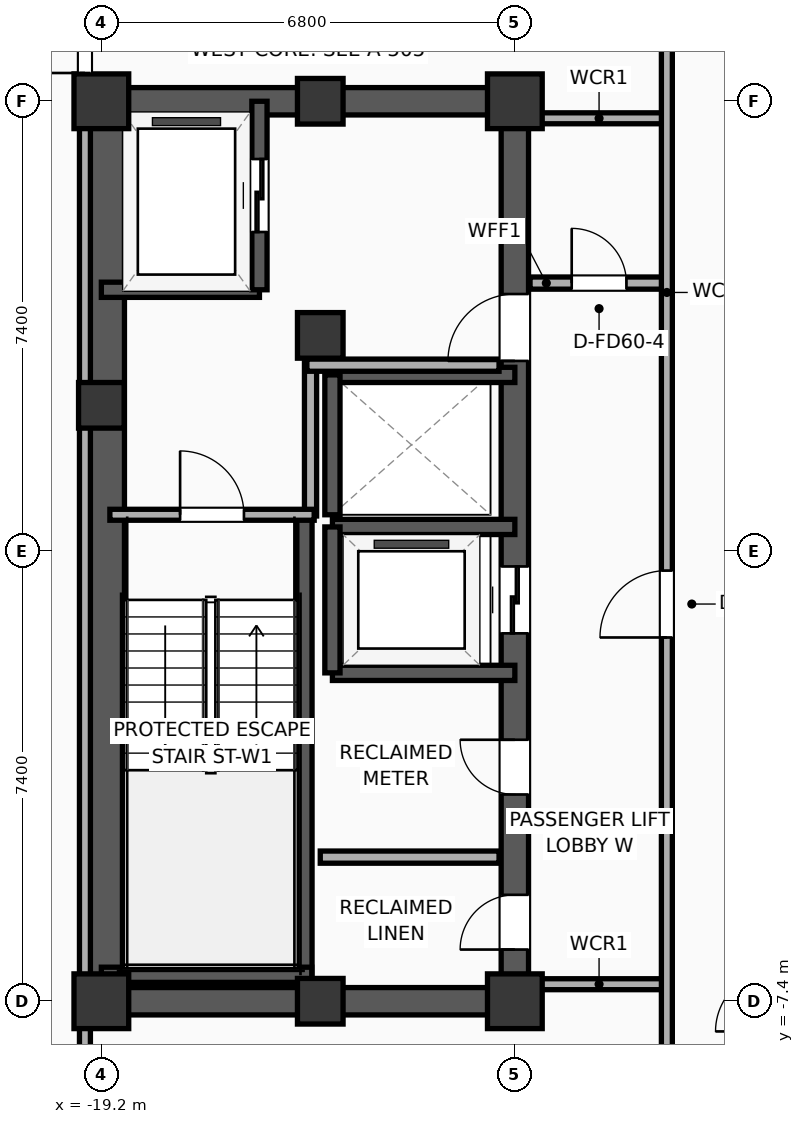
"""IFC4 building model, lengths in metres.
Left out: names, types, materials, properties, quantities, classifications, styles, units other than length and angle.
Written with IfcOpenShell. Run it as: python <this file> out.ifc"""

import sys

from ifc_helpers import new_model, si_unit, direction, frame, frame_2d, origin, origin_2d, place, context, subcontext, project, spatial, rectangle, extrude, element, fill, save


model = new_model("IFC4")
c1 = context("Model", 3, precision=1e-05, world=origin(), true_north=direction((0.0, 1.0)))
c2 = subcontext(c1, "Body", "Model", "MODEL_VIEW")
j1 = project(units=[si_unit("LENGTHUNIT", "METRE"), si_unit("PLANEANGLEUNIT", "RADIAN")], contexts=[c1])
p1 = place(None, origin())
s1 = spatial("IfcSite", under=j1, at=p1, CompositionType="ELEMENT")
p2 = place(p1, origin())
s2 = spatial("IfcBuilding", under=s1, at=p2, CompositionType="ELEMENT")
p3 = place(p2, frame((0.0, 0.0, 144.3)))
s3 = spatial("IfcBuildingStorey", under=s2, at=p3, CompositionType="ELEMENT", Elevation=144.3)
p4 = place(p3, frame((-19.2, -7.4, 0.0), z_axis=(0.0, 0.0, 1.0), x_axis=(1.0, 0.0, 0.0)))
e1 = element("IfcColumn", 1, at=p4, inside=s3, PredefinedType="COLUMN", context=c2, shape_type="SweptSolid", body=[
    extrude(rectangle(XDim=0.9, YDim=0.9, at=origin_2d()), origin(), (0.0, 0.0, 1.0), 3.9),
])
p5 = place(p3, frame((-19.2, 2.4, 0.0), z_axis=(0.0, 0.0, 1.0), x_axis=(1.0, 0.0, 0.0)))
e2 = element("IfcColumn", 2, at=p5, inside=s3, PredefinedType="COLUMN", context=c2, shape_type="SweptSolid", body=[
    extrude(rectangle(XDim=0.75, YDim=0.75, at=origin_2d()), origin(), (0.0, 0.0, 1.0), 3.9),
])
p6 = place(p3, frame((-19.2, 7.4, 0.0), z_axis=(0.0, 0.0, 1.0), x_axis=(1.0, 0.0, 0.0)))
e3 = element("IfcColumn", 3, at=p6, inside=s3, PredefinedType="COLUMN", context=c2, shape_type="SweptSolid", body=[
    extrude(rectangle(XDim=0.9, YDim=0.9, at=origin_2d()), origin(), (0.0, 0.0, 1.0), 3.9),
])
for number, where, z_axis, x_axis in (
    (4, (-15.6, -7.4, 0.0), (0.0, 0.0, 1.0), (1.0, 0.0, 0.0)),
    (5, (-15.6, 7.4, 0.0), (0.0, 0.0, 1.0), (1.0, 0.0, 0.0)),
):
    element("IfcColumn", number, at=place(p3, frame(where, z_axis=z_axis, x_axis=x_axis)), inside=s3, PredefinedType="COLUMN", context=c2, shape_type="SweptSolid", body=[
        extrude(rectangle(XDim=0.75, YDim=0.75, at=origin_2d()), origin(), (0.0, 0.0, 1.0), 3.9),
    ])
p7 = place(p3, frame((-12.4, -7.4, 0.0), z_axis=(0.0, 0.0, 1.0), x_axis=(1.0, 0.0, 0.0)))
e6 = element("IfcColumn", 6, at=p7, inside=s3, PredefinedType="COLUMN", context=c2, shape_type="SweptSolid", body=[
    extrude(rectangle(XDim=0.9, YDim=0.9, at=origin_2d()), origin(), (0.0, 0.0, 1.0), 3.9),
])
p8 = place(p3, frame((-15.6, 3.55, 0.0), z_axis=(0.0, 0.0, 1.0), x_axis=(1.0, 0.0, 0.0)))
e7 = element("IfcColumn", 7, at=p8, inside=s3, PredefinedType="COLUMN", context=c2, shape_type="SweptSolid", body=[
    extrude(rectangle(XDim=0.75, YDim=0.75, at=origin_2d()), origin(), (0.0, 0.0, 1.0), 3.9),
])
p9 = place(p3, frame((-12.4, 7.4, 0.0), z_axis=(0.0, 0.0, 1.0), x_axis=(1.0, 0.0, 0.0)))
e8 = element("IfcColumn", 8, at=p9, inside=s3, PredefinedType="COLUMN", context=c2, shape_type="SweptSolid", body=[
    extrude(rectangle(XDim=0.9, YDim=0.9, at=origin_2d()), origin(), (0.0, 0.0, 1.0), 3.9),
])
for number, where, z_axis, x_axis in (
    (9, (-19.425, -7.4, 0.0), (0.0, 0.0, 1.0), (1.0, 0.0, 0.0)),
    (10, (-19.425, 7.4, 0.0), (0.0, 0.0, 1.0), (1.0, 0.0, 0.0)),
):
    element("IfcWall", number, at=place(p3, frame(where, z_axis=z_axis, x_axis=x_axis)), inside=s3, PredefinedType="SHEAR", context=c2, shape_type="SweptSolid", body=[
        extrude(rectangle(XDim=7.25, YDim=0.45, at=frame_2d((3.625, 0.0))), origin(), (0.0, 0.0, 1.0), 3.65),
    ])
p10 = place(p3, frame((-19.145, -7.4, 0.0), z_axis=(0.0, 0.0, 1.0), x_axis=(0.0, 1.0, 0.0)))
e11 = element("IfcWall", 11, at=p10, inside=s3, PredefinedType="SHEAR", context=c2, shape_type="SweptSolid", body=[
    extrude(rectangle(XDim=14.8, YDim=0.65, at=frame_2d((7.4, 0.0))), origin(), (0.0, 0.0, 1.0), 3.65),
])
p11 = place(p3, frame((-12.4, -7.4, 0.0), z_axis=(0.0, 0.0, 1.0), x_axis=(0.0, 1.0, 0.0)))
e12 = element("IfcWall", 12, at=p11, inside=s3, PredefinedType="SHEAR", context=c2, shape_type="SweptSolid", body=[
    extrude(rectangle(XDim=14.8, YDim=0.45, at=frame_2d((7.4, 0.0))), origin(), (0.0, 0.0, 1.0), 3.65),
])
p12 = place(p11, frame((6.05, 0.0, 0.0)))
e13 = element("IfcOpeningElement", 13, at=p12, cuts=e12, PredefinedType="OPENING", context=c2, shape_type="SweptSolid", body=[
    extrude(rectangle(XDim=1.1, YDim=2.05, at=frame_2d((0.55, 1.025))), frame((0.0, 0.235, 0.0), z_axis=(0.0, -1.0, 0.0), x_axis=(1.0, 0.0, 0.0)), (0.0, 0.0, 1.0), 0.47),
])
p13 = place(p11, frame((10.53, 0.0, 0.0)))
e14 = element("IfcOpeningElement", 14, at=p13, cuts=e12, PredefinedType="OPENING", context=c2, shape_type="SweptSolid", body=[
    extrude(rectangle(XDim=1.1, YDim=2.05, at=frame_2d((0.55, 1.025))), frame((0.0, 0.235, 0.0), z_axis=(0.0, -1.0, 0.0), x_axis=(1.0, 0.0, 0.0)), (0.0, 0.0, 1.0), 0.47),
])
p14 = place(p11, frame((0.85, 0.0, 0.0)))
e15 = element("IfcOpeningElement", 15, at=p14, cuts=e12, PredefinedType="OPENING", context=c2, shape_type="SweptSolid", body=[
    extrude(rectangle(XDim=0.9, YDim=2.05, at=frame_2d((0.45, 1.025))), frame((0.0, 0.235, 0.0), z_axis=(0.0, -1.0, 0.0), x_axis=(1.0, 0.0, 0.0)), (0.0, 0.0, 1.0), 0.47),
])
p15 = place(p11, frame((3.4, 0.0, 0.0)))
e16 = element("IfcOpeningElement", 16, at=p15, cuts=e12, PredefinedType="OPENING", context=c2, shape_type="SweptSolid", body=[
    extrude(rectangle(XDim=0.9, YDim=2.05, at=frame_2d((0.45, 1.025))), frame((0.0, 0.235, 0.0), z_axis=(0.0, -1.0, 0.0), x_axis=(1.0, 0.0, 0.0)), (0.0, 0.0, 1.0), 0.47),
])
p16 = place(p3, frame((-15.86, -7.085, 0.0), z_axis=(0.0, 0.0, 1.0), x_axis=(0.0, 1.0, 0.0)))
e17 = element("IfcWall", 17, at=p16, inside=s3, PredefinedType="SOLIDWALL", context=c2, shape_type="SweptSolid", body=[
    extrude(rectangle(XDim=7.685, YDim=0.25, at=frame_2d((3.843, 0.0))), origin(), (0.0, 0.0, 1.0), 3.65),
])
p17 = place(p3, frame((-19.2, -6.965, 0.0), z_axis=(0.0, 0.0, 1.0), x_axis=(1.0, 0.0, 0.0)))
e18 = element("IfcWall", 18, at=p17, inside=s3, PredefinedType="SOLIDWALL", context=c2, shape_type="SweptSolid", body=[
    extrude(rectangle(XDim=3.46, YDim=0.25, at=frame_2d((1.73, 0.0))), origin(), (0.0, 0.0, 1.0), 3.65),
])
p18 = place(p3, frame((-19.2, 4.3, 0.0), z_axis=(0.0, 0.0, 1.0), x_axis=(1.0, 0.0, 0.0)))
e19 = element("IfcWall", 19, at=p18, inside=s3, PredefinedType="SOLIDWALL", context=c2, shape_type="SweptSolid", body=[
    extrude(rectangle(XDim=2.6, YDim=0.25, at=frame_2d((1.3, 0.0))), origin(), (0.0, 0.0, 1.0), 3.65),
])
p19 = place(p3, frame((-16.6, 4.3, 0.0), z_axis=(0.0, 0.0, 1.0), x_axis=(0.0, 1.0, 0.0)))
e20 = element("IfcWall", 20, at=p19, inside=s3, PredefinedType="SOLIDWALL", context=c2, shape_type="SweptSolid", body=[
    extrude(rectangle(XDim=3.1, YDim=0.25, at=frame_2d((1.55, 0.0))), origin(), (0.0, 0.0, 1.0), 3.65),
])
p20 = place(p19, frame((0.95, 0.0, 0.0)))
e21 = element("IfcOpeningElement", 21, at=p20, cuts=e20, PredefinedType="OPENING", context=c2, shape_type="SweptSolid", body=[
    extrude(rectangle(XDim=1.2, YDim=2.05, at=frame_2d((0.6, 1.025))), frame((0.0, 0.135, 0.0), z_axis=(0.0, -1.0, 0.0), x_axis=(1.0, 0.0, 0.0)), (0.0, 0.0, 1.0), 0.27),
])
for number, where, z_axis, x_axis in (
    (22, (-15.4, -2.0, 0.0), (0.0, 0.0, 1.0), (1.0, 0.0, 0.0)),
    (23, (-12.4, 0.4, 0.0), (0.0, 0.0, 1.0), (-1.0, 0.0, 0.0)),
):
    element("IfcWall", number, at=place(p3, frame(where, z_axis=z_axis, x_axis=x_axis)), inside=s3, PredefinedType="SOLIDWALL", context=c2, shape_type="SweptSolid", body=[
        extrude(rectangle(XDim=3.0, YDim=0.25, at=frame_2d((1.5, 0.0))), origin(), (0.0, 0.0, 1.0), 3.65),
    ])
p21 = place(p3, frame((-15.4, 0.4, 0.0), z_axis=(0.0, 0.0, 1.0), x_axis=(0.0, -1.0, 0.0)))
e24 = element("IfcWall", 24, at=p21, inside=s3, PredefinedType="SOLIDWALL", context=c2, shape_type="SweptSolid", body=[
    extrude(rectangle(XDim=2.4, YDim=0.25, at=frame_2d((1.2, 0.0))), origin(), (0.0, 0.0, 1.0), 3.65),
])
p22 = place(p3, frame((-12.4, 2.9, 0.0), z_axis=(0.0, 0.0, 1.0), x_axis=(-1.0, 0.0, 0.0)))
e25 = element("IfcWall", 25, at=p22, inside=s3, PredefinedType="SOLIDWALL", context=c2, shape_type="SweptSolid", body=[
    extrude(rectangle(XDim=3.0, YDim=0.25, at=frame_2d((1.5, 0.0))), origin(), (0.0, 0.0, 1.0), 3.65),
])
p23 = place(p3, frame((-15.4, 2.9, 0.0), z_axis=(0.0, 0.0, 1.0), x_axis=(0.0, -1.0, 0.0)))
e26 = element("IfcWall", 26, at=p23, inside=s3, PredefinedType="SOLIDWALL", context=c2, shape_type="SweptSolid", body=[
    extrude(rectangle(XDim=2.3, YDim=0.25, at=frame_2d((1.15, 0.0))), origin(), (0.0, 0.0, 1.0), 3.65),
])
p24 = place(p3, frame((-15.76, 0.58, 0.0), z_axis=(0.0, 0.0, 1.0), x_axis=(0.0, 1.0, 0.0)))
e27 = element("IfcWall", 27, at=p24, inside=s3, PredefinedType="PARTITIONING", context=c2, shape_type="SweptSolid", body=[
    extrude(rectangle(XDim=2.52, YDim=0.2, at=frame_2d((1.26, 0.0))), origin(), (0.0, 0.0, 1.0), 3.65),
])
p25 = place(p3, frame((-15.82, 3.06, 0.0), z_axis=(0.0, 0.0, 1.0), x_axis=(1.0, 0.0, 0.0)))
e28 = element("IfcWall", 28, at=p25, inside=s3, PredefinedType="PARTITIONING", context=c2, shape_type="SweptSolid", body=[
    extrude(rectangle(XDim=3.16, YDim=0.2, at=frame_2d((1.58, 0.0))), origin(), (0.0, 0.0, 1.0), 3.65),
])
p26 = place(p3, frame((-19.06, 0.6, 0.0), z_axis=(0.0, 0.0, 1.0), x_axis=(1.0, 0.0, 0.0)))
e29 = element("IfcWall", 29, at=p26, inside=s3, PredefinedType="PARTITIONING", context=c2, shape_type="SweptSolid", body=[
    extrude(rectangle(XDim=3.36, YDim=0.18, at=frame_2d((1.68, 0.0))), origin(), (0.0, 0.0, 1.0), 3.65),
])
p27 = place(p26, frame((1.155, 0.0, 0.0)))
e30 = element("IfcOpeningElement", 30, at=p27, cuts=e29, PredefinedType="OPENING", context=c2, shape_type="SweptSolid", body=[
    extrude(rectangle(XDim=1.05, YDim=2.05, at=frame_2d((0.525, 1.025))), frame((0.0, 0.1, 0.0), z_axis=(0.0, -1.0, 0.0), x_axis=(1.0, 0.0, 0.0)), (0.0, 0.0, 1.0), 0.2),
])
p28 = place(p3, frame((-15.6, -5.03, 0.0), z_axis=(0.0, 0.0, 1.0), x_axis=(1.0, 0.0, 0.0)))
e31 = element("IfcWall", 31, at=p28, inside=s3, PredefinedType="PARTITIONING", context=c2, shape_type="SweptSolid", body=[
    extrude(rectangle(XDim=2.94, YDim=0.2, at=frame_2d((1.47, 0.0))), origin(), (0.0, 0.0, 1.0), 3.65),
])
p29 = place(p3, frame((-12.15, 4.41, 0.0), z_axis=(0.0, 0.0, 1.0), x_axis=(1.0, 0.0, 0.0)))
e32 = element("IfcWall", 32, at=p29, inside=s3, PredefinedType="PARTITIONING", context=c2, shape_type="SweptSolid", body=[
    extrude(rectangle(XDim=2.27, YDim=0.2, at=frame_2d((1.135, 0.0))), origin(), (0.0, 0.0, 1.0), 3.65),
])
p30 = place(p29, frame((0.685, 0.0, 0.0)))
e33 = element("IfcOpeningElement", 33, at=p30, cuts=e32, PredefinedType="OPENING", context=c2, shape_type="SweptSolid", body=[
    extrude(rectangle(XDim=0.9, YDim=2.05, at=frame_2d((0.45, 1.025))), frame((0.0, 0.11, 0.0), z_axis=(0.0, -1.0, 0.0), x_axis=(1.0, 0.0, 0.0)), (0.0, 0.0, 1.0), 0.22),
])
for number, where, z_axis, x_axis in (
    (34, (-12.15, 7.12, 0.0), (0.0, 0.0, 1.0), (1.0, 0.0, 0.0)),
    (35, (-12.15, -7.12, 0.0), (0.0, 0.0, 1.0), (1.0, 0.0, 0.0)),
):
    element("IfcWall", number, at=place(p3, frame(where, z_axis=z_axis, x_axis=x_axis)), inside=s3, PredefinedType="PARTITIONING", context=c2, shape_type="SweptSolid", body=[
        extrude(rectangle(XDim=2.27, YDim=0.18, at=frame_2d((1.135, 0.0))), origin(), (0.0, 0.0, 1.0), 3.65),
    ])
p31 = place(p3, frame((-9.9, -8.68, 0.0), z_axis=(0.0, 0.0, 1.0), x_axis=(0.0, 1.0, 0.0)))
e36 = element("IfcWall", 36, at=p31, inside=s3, PredefinedType="PARTITIONING", context=c2, shape_type="SweptSolid", body=[
    extrude(rectangle(XDim=17.36, YDim=0.18, at=frame_2d((8.68, 0.0))), origin(), (0.0, 0.0, 1.0), 3.65),
])
p32 = place(p31, frame((7.262, 0.0, 0.0)))
e37 = element("IfcOpeningElement", 37, at=p32, cuts=e36, PredefinedType="OPENING", context=c2, shape_type="SweptSolid", body=[
    extrude(rectangle(XDim=1.1, YDim=2.05, at=frame_2d((0.55, 1.025))), frame((0.0, 0.1, 0.0), z_axis=(0.0, -1.0, 0.0), x_axis=(1.0, 0.0, 0.0)), (0.0, 0.0, 1.0), 0.2),
])
p33 = place(p3, frame((-19.47, -10.15, 0.0), z_axis=(0.0, 0.0, 1.0), x_axis=(0.0, 1.0, 0.0)))
e38 = element("IfcWall", 38, at=p33, inside=s3, PredefinedType="PARTITIONING", context=c2, shape_type="SweptSolid", body=[
    extrude(rectangle(XDim=20.3, YDim=0.18, at=frame_2d((10.15, 0.0))), origin(), (0.0, 0.0, 1.0), 2.54),
])
p34 = place(p33, frame((18.015, 0.0, 0.0)))
e39 = element("IfcOpeningElement", 39, at=p34, cuts=e38, PredefinedType="OPENING", context=c2, shape_type="SweptSolid", body=[
    extrude(rectangle(XDim=0.95, YDim=2.05, at=frame_2d((0.475, 1.025))), frame((0.0, 0.1, 0.0), z_axis=(0.0, -1.0, 0.0), x_axis=(1.0, 0.0, 0.0)), (0.0, 0.0, 1.0), 0.2),
])
p35 = place(p20, origin())
e40 = element("IfcDoor", 40, at=p35, inside=s3, OperationType="SLIDING_TO_LEFT", PredefinedType="DOOR", context=c2, shape_type="SweptSolid", body=[
    extrude(rectangle(XDim=1.2, YDim=2.05, at=frame_2d((0.6, 1.025))), frame((0.0, 0.025, 0.0), z_axis=(0.0, -1.0, 0.0), x_axis=(1.0, 0.0, 0.0)), (0.0, 0.0, 1.0), 0.05),
])
fill(e21, e40)
p36 = place(p12, origin())
e41 = element("IfcDoor", 41, at=p36, inside=s3, OperationType="SLIDING_TO_LEFT", PredefinedType="DOOR", context=c2, shape_type="SweptSolid", body=[
    extrude(rectangle(XDim=1.1, YDim=2.05, at=frame_2d((0.55, 1.025))), frame((0.0, 0.025, 0.0), z_axis=(0.0, -1.0, 0.0), x_axis=(1.0, 0.0, 0.0)), (0.0, 0.0, 1.0), 0.05),
])
fill(e13, e41)
p37 = place(p27, origin())
e42 = element("IfcDoor", 42, at=p37, inside=s3, OperationType="SINGLE_SWING_LEFT", PredefinedType="DOOR", context=c2, shape_type="SweptSolid", body=[
    extrude(rectangle(XDim=1.05, YDim=2.05, at=frame_2d((0.525, 1.025))), frame((0.0, 0.025, 0.0), z_axis=(0.0, -1.0, 0.0), x_axis=(1.0, 0.0, 0.0)), (0.0, 0.0, 1.0), 0.05),
])
fill(e30, e42)
p38 = place(p30, origin())
e43 = element("IfcDoor", 43, at=p38, inside=s3, OperationType="SINGLE_SWING_LEFT", PredefinedType="DOOR", context=c2, shape_type="SweptSolid", body=[
    extrude(rectangle(XDim=0.9, YDim=2.05, at=frame_2d((0.45, 1.025))), frame((0.0, 0.025, 0.0), z_axis=(0.0, -1.0, 0.0), x_axis=(1.0, 0.0, 0.0)), (0.0, 0.0, 1.0), 0.05),
])
fill(e33, e43)
p39 = place(p32, origin())
e44 = element("IfcDoor", 44, at=p39, inside=s3, OperationType="SINGLE_SWING_LEFT", PredefinedType="DOOR", context=c2, shape_type="SweptSolid", body=[
    extrude(rectangle(XDim=1.1, YDim=2.05, at=frame_2d((0.55, 1.025))), frame((0.0, 0.025, 0.0), z_axis=(0.0, -1.0, 0.0), x_axis=(1.0, 0.0, 0.0)), (0.0, 0.0, 1.0), 0.05),
])
fill(e37, e44)
p40 = place(p34, origin())
e45 = element("IfcDoor", 45, at=p40, inside=s3, OperationType="SINGLE_SWING_LEFT", PredefinedType="DOOR", context=c2, shape_type="SweptSolid", body=[
    extrude(rectangle(XDim=0.95, YDim=2.05, at=frame_2d((0.475, 1.025))), frame((0.0, 0.025, 0.0), z_axis=(0.0, -1.0, 0.0), x_axis=(1.0, 0.0, 0.0)), (0.0, 0.0, 1.0), 0.05),
])
fill(e39, e45)
p41 = place(p13, origin())
e46 = element("IfcDoor", 46, at=p41, inside=s3, OperationType="SINGLE_SWING_LEFT", PredefinedType="DOOR", context=c2, shape_type="SweptSolid", body=[
    extrude(rectangle(XDim=1.1, YDim=2.05, at=frame_2d((0.55, 1.025))), frame((0.0, 0.025, 0.0), z_axis=(0.0, -1.0, 0.0), x_axis=(1.0, 0.0, 0.0)), (0.0, 0.0, 1.0), 0.05),
])
fill(e14, e46)
p42 = place(p14, origin())
e47 = element("IfcDoor", 47, at=p42, inside=s3, OperationType="SINGLE_SWING_LEFT", PredefinedType="DOOR", context=c2, shape_type="SweptSolid", body=[
    extrude(rectangle(XDim=0.9, YDim=2.05, at=frame_2d((0.45, 1.025))), frame((0.0, 0.025, 0.0), z_axis=(0.0, -1.0, 0.0), x_axis=(1.0, 0.0, 0.0)), (0.0, 0.0, 1.0), 0.05),
])
fill(e15, e47)
p43 = place(p15, origin())
e48 = element("IfcDoor", 48, at=p43, inside=s3, OperationType="SINGLE_SWING_RIGHT", PredefinedType="DOOR", context=c2, shape_type="SweptSolid", body=[
    extrude(rectangle(XDim=0.9, YDim=2.05, at=frame_2d((0.45, 1.025))), frame((0.0, 0.025, 0.0), z_axis=(0.0, -1.0, 0.0), x_axis=(1.0, 0.0, 0.0)), (0.0, 0.0, 1.0), 0.05),
])
fill(e16, e48)
save(model, sys.argv[1])
